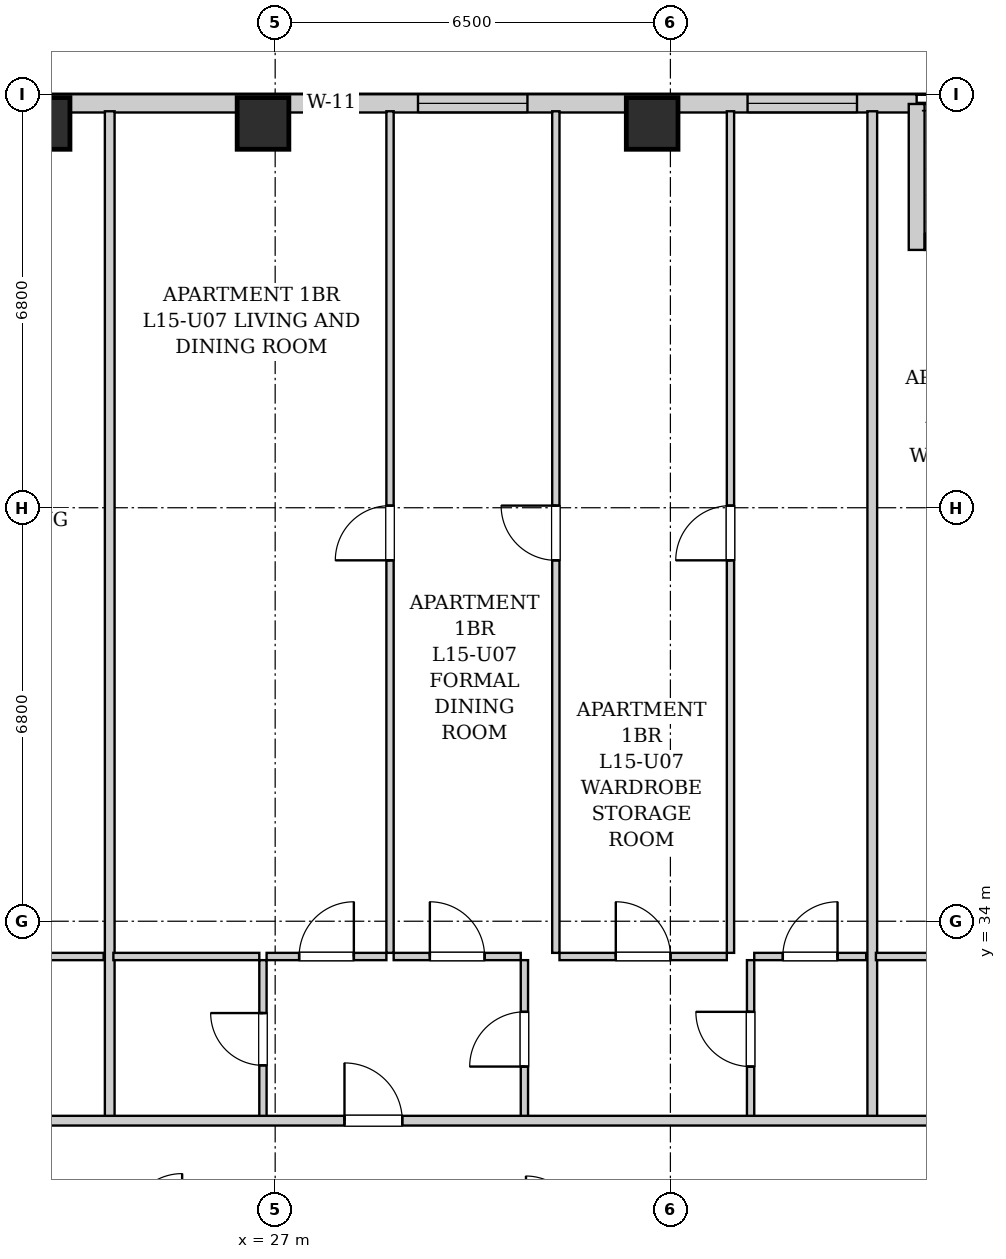
"""IFC4 building model, lengths in metres.
Left out: names, types, materials, properties, quantities, classifications, styles, units other than length and angle.
Written with IfcOpenShell. Run it as: python <this file> out.ifc"""

import sys

from ifc_helpers import new_model, si_unit, direction, frame, frame_2d, origin, origin_2d, place, context, subcontext, project, spatial, rectangle, extrude, element, fill, save


model = new_model("IFC4")
c1 = context("Model", 3, precision=1e-05, world=origin(), true_north=direction((0.0, 1.0)))
c2 = subcontext(c1, "Body", "Model", "MODEL_VIEW")
j1 = project(units=[si_unit("LENGTHUNIT", "METRE"), si_unit("PLANEANGLEUNIT", "RADIAN")], contexts=[c1])
p1 = place(None, origin())
s1 = spatial("IfcSite", under=j1, at=p1, CompositionType="ELEMENT")
p2 = place(p1, origin())
s2 = spatial("IfcBuilding", under=s1, at=p2, CompositionType="ELEMENT")
p3 = place(p2, frame((0.0, 0.0, 57.8)))
s3 = spatial("IfcBuildingStorey", under=s2, at=p3, CompositionType="ELEMENT", Elevation=57.8)
for number, where, z_axis, x_axis in (
    (1, (23.2, 47.12, 0.0), (0.0, 0.0, 1.0), (1.0, 0.0, 0.0)),
    (2, (26.8, 47.12, 0.0), (0.0, 0.0, 1.0), (1.0, 0.0, 0.0)),
    (3, (33.2, 47.12, 0.0), (0.0, 0.0, 1.0), (1.0, 0.0, 0.0)),
):
    element("IfcColumn", number, at=place(p3, frame(where, z_axis=z_axis, x_axis=x_axis)), inside=s3, PredefinedType="COLUMN", context=c2, shape_type="SweptSolid", body=[
        extrude(rectangle(XDim=0.85, YDim=0.85, at=origin_2d()), origin(), (0.0, 0.0, 1.0), 3.2),
    ])
p4 = place(p3, frame((10.0, 47.45, 0.0), z_axis=(0.0, 0.0, 1.0), x_axis=(1.0, 0.0, 0.0)))
e4 = element("IfcWall", 4, at=p4, inside=s3, PredefinedType="SOLIDWALL", context=c2, shape_type="SweptSolid", body=[
    extrude(rectangle(XDim=27.55, YDim=0.3, at=frame_2d((13.775, 0.0))), origin(), (0.0, 0.0, 1.0), 1.975),
])
p5 = place(p4, frame((1.735, 0.0, 0.55)))
e5 = element("IfcOpeningElement", 5, at=p5, cuts=e4, PredefinedType="OPENING", context=c2, shape_type="SweptSolid", body=[
    extrude(rectangle(XDim=1.8, YDim=1.2, at=frame_2d((0.9, 0.6))), frame((0.0, 0.16, 0.0), z_axis=(0.0, -1.0, 0.0), x_axis=(1.0, 0.0, 0.0)), (0.0, 0.0, 1.0), 0.32),
])
p6 = place(p4, frame((5.415, 0.0, 0.55)))
e6 = element("IfcOpeningElement", 6, at=p6, cuts=e4, PredefinedType="OPENING", context=c2, shape_type="SweptSolid", body=[
    extrude(rectangle(XDim=1.8, YDim=1.2, at=frame_2d((0.9, 0.6))), frame((0.0, 0.16, 0.0), z_axis=(0.0, -1.0, 0.0), x_axis=(1.0, 0.0, 0.0)), (0.0, 0.0, 1.0), 0.32),
])
p7 = place(p4, frame((10.617, 0.0, 0.55)))
e7 = element("IfcOpeningElement", 7, at=p7, cuts=e4, PredefinedType="OPENING", context=c2, shape_type="SweptSolid", body=[
    extrude(rectangle(XDim=1.8, YDim=1.2, at=frame_2d((0.9, 0.6))), frame((0.0, 0.16, 0.0), z_axis=(0.0, -1.0, 0.0), x_axis=(1.0, 0.0, 0.0)), (0.0, 0.0, 1.0), 0.32),
])
p8 = place(p4, frame((17.5, 0.0, 0.55)))
e8 = element("IfcOpeningElement", 8, at=p8, cuts=e4, PredefinedType="OPENING", context=c2, shape_type="SweptSolid", body=[
    extrude(rectangle(XDim=0.85, YDim=1.2, at=frame_2d((0.425, 0.6))), frame((0.0, 0.16, 0.0), z_axis=(0.0, -1.0, 0.0), x_axis=(1.0, 0.0, 0.0)), (0.0, 0.0, 1.0), 0.32),
])
p9 = place(p4, frame((19.349, 0.0, 0.55)))
e9 = element("IfcOpeningElement", 9, at=p9, cuts=e4, PredefinedType="OPENING", context=c2, shape_type="SweptSolid", body=[
    extrude(rectangle(XDim=1.8, YDim=1.2, at=frame_2d((0.9, 0.6))), frame((0.0, 0.16, 0.0), z_axis=(0.0, -1.0, 0.0), x_axis=(1.0, 0.0, 0.0)), (0.0, 0.0, 1.0), 0.32),
])
p10 = place(p4, frame((24.769, 0.0, 0.55)))
e10 = element("IfcOpeningElement", 10, at=p10, cuts=e4, PredefinedType="OPENING", context=c2, shape_type="SweptSolid", body=[
    extrude(rectangle(XDim=1.8, YDim=1.2, at=frame_2d((0.9, 0.6))), frame((0.0, 0.16, 0.0), z_axis=(0.0, -1.0, 0.0), x_axis=(1.0, 0.0, 0.0)), (0.0, 0.0, 1.0), 0.32),
])
p11 = place(p3, frame((37.55, 47.44, 0.0), z_axis=(0.0, 0.0, 1.0), x_axis=(0.0, -1.0, 0.0)))
e11 = element("IfcWall", 11, at=p11, inside=s3, PredefinedType="SOLIDWALL", context=c2, shape_type="SweptSolid", body=[
    extrude(rectangle(XDim=2.4, YDim=0.26, at=frame_2d((1.2, 0.0))), origin(), (0.0, 0.0, 1.0), 2.94),
])
p12 = place(p3, frame((37.684, 45.17, 0.0), z_axis=(0.0, 0.0, 1.0), x_axis=(1.0, 0.0, 0.0)))
e12 = element("IfcWall", 12, at=p12, inside=s3, PredefinedType="SOLIDWALL", context=c2, shape_type="SweptSolid", body=[
    extrude(rectangle(XDim=4.882, YDim=0.26, at=frame_2d((2.441, 0.0))), origin(), (0.0, 0.0, 1.0), 2.94),
])
p13 = place(p12, frame((2.496, 0.0, 0.0)))
e13 = element("IfcOpeningElement", 13, at=p13, cuts=e12, PredefinedType="OPENING", context=c2, shape_type="SweptSolid", body=[
    extrude(rectangle(XDim=1.1, YDim=2.0, at=frame_2d((0.55, 1.0))), frame((0.0, 0.14, 0.0), z_axis=(0.0, -1.0, 0.0), x_axis=(1.0, 0.0, 0.0)), (0.0, 0.0, 1.0), 0.28),
])
p14 = place(p12, frame((0.336, 0.0, 0.85)))
e14 = element("IfcOpeningElement", 14, at=p14, cuts=e12, PredefinedType="OPENING", context=c2, shape_type="SweptSolid", body=[
    extrude(rectangle(XDim=1.8, YDim=1.65, at=frame_2d((0.9, 0.825))), frame((0.0, 0.14, 0.0), z_axis=(0.0, -1.0, 0.0), x_axis=(1.0, 0.0, 0.0)), (0.0, 0.0, 1.0), 0.28),
])
p15 = place(p3, frame((20.826, 33.42, 0.0), z_axis=(0.0, 0.0, 1.0), x_axis=(1.0, 0.0, 0.0)))
e15 = element("IfcWall", 15, at=p15, inside=s3, PredefinedType="PARTITIONING", context=c2, shape_type="SweptSolid", body=[
    extrude(rectangle(XDim=3.353, YDim=0.12, at=frame_2d((1.677, 0.0))), origin(), (0.0, 0.0, 1.0), 2.94),
])
p16 = place(p15, frame((1.226, 0.0, 0.0)))
e16 = element("IfcOpeningElement", 16, at=p16, cuts=e15, PredefinedType="OPENING", context=c2, shape_type="SweptSolid", body=[
    extrude(rectangle(XDim=0.9, YDim=2.05, at=frame_2d((0.45, 1.025))), frame((0.0, 0.07, 0.0), z_axis=(0.0, -1.0, 0.0), x_axis=(1.0, 0.0, 0.0)), (0.0, 0.0, 1.0), 0.14),
])
p17 = place(p3, frame((24.279, 30.76, 0.0), z_axis=(0.0, 0.0, 1.0), x_axis=(0.0, 1.0, 0.0)))
e17 = element("IfcWall", 17, at=p17, inside=s3, PredefinedType="PARTITIONING", context=c2, shape_type="SweptSolid", body=[
    extrude(rectangle(XDim=16.56, YDim=0.16, at=frame_2d((8.28, 0.0))), origin(), (0.0, 0.0, 1.0), 2.94),
])
p18 = place(p3, frame((26.799, 30.76, 0.0), z_axis=(0.0, 0.0, 1.0), x_axis=(0.0, 1.0, 0.0)))
e18 = element("IfcWall", 18, at=p18, inside=s3, PredefinedType="PARTITIONING", context=c2, shape_type="SweptSolid", body=[
    extrude(rectangle(XDim=2.6, YDim=0.12, at=frame_2d((1.3, 0.0))), origin(), (0.0, 0.0, 1.0), 2.94),
])
p19 = place(p18, frame((0.87, 0.0, 0.0)))
e19 = element("IfcOpeningElement", 19, at=p19, cuts=e18, PredefinedType="OPENING", context=c2, shape_type="SweptSolid", body=[
    extrude(rectangle(XDim=0.86, YDim=2.05, at=frame_2d((0.43, 1.025))), frame((0.0, 0.07, 0.0), z_axis=(0.0, -1.0, 0.0), x_axis=(1.0, 0.0, 0.0)), (0.0, 0.0, 1.0), 0.14),
])
p20 = place(p3, frame((24.339, 33.42, 0.0), z_axis=(0.0, 0.0, 1.0), x_axis=(1.0, 0.0, 0.0)))
e20 = element("IfcWall", 20, at=p20, inside=s3, PredefinedType="PARTITIONING", context=c2, shape_type="SweptSolid", body=[
    extrude(rectangle(XDim=2.4, YDim=0.12, at=frame_2d((1.2, 0.0))), origin(), (0.0, 0.0, 1.0), 2.94),
])
p21 = place(p3, frame((31.099, 30.76, 0.0), z_axis=(0.0, 0.0, 1.0), x_axis=(0.0, 1.0, 0.0)))
e21 = element("IfcWall", 21, at=p21, inside=s3, PredefinedType="PARTITIONING", context=c2, shape_type="SweptSolid", body=[
    extrude(rectangle(XDim=2.6, YDim=0.12, at=frame_2d((1.3, 0.0))), origin(), (0.0, 0.0, 1.0), 2.94),
])
p22 = place(p21, frame((0.85, 0.0, 0.0)))
e22 = element("IfcOpeningElement", 22, at=p22, cuts=e21, PredefinedType="OPENING", context=c2, shape_type="SweptSolid", body=[
    extrude(rectangle(XDim=0.9, YDim=2.05, at=frame_2d((0.45, 1.025))), frame((0.0, 0.07, 0.0), z_axis=(0.0, -1.0, 0.0), x_axis=(1.0, 0.0, 0.0)), (0.0, 0.0, 1.0), 0.14),
])
p23 = place(p3, frame((26.859, 33.42, 0.0), z_axis=(0.0, 0.0, 1.0), x_axis=(1.0, 0.0, 0.0)))
e23 = element("IfcWall", 23, at=p23, inside=s3, PredefinedType="PARTITIONING", context=c2, shape_type="SweptSolid", body=[
    extrude(rectangle(XDim=1.97, YDim=0.12, at=frame_2d((0.985, 0.0))), origin(), (0.0, 0.0, 1.0), 2.94),
])
p24 = place(p23, frame((0.535, 0.0, 0.0)))
e24 = element("IfcOpeningElement", 24, at=p24, cuts=e23, PredefinedType="OPENING", context=c2, shape_type="SweptSolid", body=[
    extrude(rectangle(XDim=0.9, YDim=2.05, at=frame_2d((0.45, 1.025))), frame((0.0, 0.07, 0.0), z_axis=(0.0, -1.0, 0.0), x_axis=(1.0, 0.0, 0.0)), (0.0, 0.0, 1.0), 0.14),
])
p25 = place(p3, frame((28.949, 33.42, 0.0), z_axis=(0.0, 0.0, 1.0), x_axis=(1.0, 0.0, 0.0)))
e25 = element("IfcWall", 25, at=p25, inside=s3, PredefinedType="PARTITIONING", context=c2, shape_type="SweptSolid", body=[
    extrude(rectangle(XDim=2.09, YDim=0.12, at=frame_2d((1.045, 0.0))), origin(), (0.0, 0.0, 1.0), 2.94),
])
p26 = place(p25, frame((0.595, 0.0, 0.0)))
e26 = element("IfcOpeningElement", 26, at=p26, cuts=e25, PredefinedType="OPENING", context=c2, shape_type="SweptSolid", body=[
    extrude(rectangle(XDim=0.9, YDim=2.05, at=frame_2d((0.45, 1.025))), frame((0.0, 0.07, 0.0), z_axis=(0.0, -1.0, 0.0), x_axis=(1.0, 0.0, 0.0)), (0.0, 0.0, 1.0), 0.14),
])
p27 = place(p3, frame((34.819, 30.76, 0.0), z_axis=(0.0, 0.0, 1.0), x_axis=(0.0, 1.0, 0.0)))
e27 = element("IfcWall", 27, at=p27, inside=s3, PredefinedType="PARTITIONING", context=c2, shape_type="SweptSolid", body=[
    extrude(rectangle(XDim=2.6, YDim=0.12, at=frame_2d((1.3, 0.0))), origin(), (0.0, 0.0, 1.0), 2.94),
])
p28 = place(p27, frame((0.85, 0.0, 0.0)))
e28 = element("IfcOpeningElement", 28, at=p28, cuts=e27, PredefinedType="OPENING", context=c2, shape_type="SweptSolid", body=[
    extrude(rectangle(XDim=0.9, YDim=2.05, at=frame_2d((0.45, 1.025))), frame((0.0, 0.07, 0.0), z_axis=(0.0, -1.0, 0.0), x_axis=(1.0, 0.0, 0.0)), (0.0, 0.0, 1.0), 0.14),
])
p29 = place(p3, frame((31.676, 33.42, 0.0), z_axis=(0.0, 0.0, 1.0), x_axis=(1.0, 0.0, 0.0)))
e29 = element("IfcWall", 29, at=p29, inside=s3, PredefinedType="PARTITIONING", context=c2, shape_type="SweptSolid", body=[
    extrude(rectangle(XDim=2.752, YDim=0.12, at=frame_2d((1.376, 0.0))), origin(), (0.0, 0.0, 1.0), 2.94),
])
p30 = place(p29, frame((0.926, 0.0, 0.0)))
e30 = element("IfcOpeningElement", 30, at=p30, cuts=e29, PredefinedType="OPENING", context=c2, shape_type="SweptSolid", body=[
    extrude(rectangle(XDim=0.9, YDim=2.05, at=frame_2d((0.45, 1.025))), frame((0.0, 0.07, 0.0), z_axis=(0.0, -1.0, 0.0), x_axis=(1.0, 0.0, 0.0)), (0.0, 0.0, 1.0), 0.14),
])
p31 = place(p3, frame((34.879, 33.42, 0.0), z_axis=(0.0, 0.0, 1.0), x_axis=(1.0, 0.0, 0.0)))
e31 = element("IfcWall", 31, at=p31, inside=s3, PredefinedType="PARTITIONING", context=c2, shape_type="SweptSolid", body=[
    extrude(rectangle(XDim=1.841, YDim=0.12, at=frame_2d((0.92, 0.0))), origin(), (0.0, 0.0, 1.0), 2.94),
])
p32 = place(p31, frame((0.47, 0.0, 0.0)))
e32 = element("IfcOpeningElement", 32, at=p32, cuts=e31, PredefinedType="OPENING", context=c2, shape_type="SweptSolid", body=[
    extrude(rectangle(XDim=0.9, YDim=2.05, at=frame_2d((0.45, 1.025))), frame((0.0, 0.07, 0.0), z_axis=(0.0, -1.0, 0.0), x_axis=(1.0, 0.0, 0.0)), (0.0, 0.0, 1.0), 0.14),
])
p33 = place(p3, frame((28.889, 33.48, 0.0), z_axis=(0.0, 0.0, 1.0), x_axis=(0.0, 1.0, 0.0)))
e33 = element("IfcWall", 33, at=p33, inside=s3, PredefinedType="PARTITIONING", context=c2, shape_type="SweptSolid", body=[
    extrude(rectangle(XDim=13.84, YDim=0.12, at=frame_2d((6.92, 0.0))), origin(), (0.0, 0.0, 1.0), 2.94),
])
p34 = place(p33, frame((6.455, 0.0, 0.0)))
e34 = element("IfcOpeningElement", 34, at=p34, cuts=e33, PredefinedType="OPENING", context=c2, shape_type="SweptSolid", body=[
    extrude(rectangle(XDim=0.9, YDim=2.05, at=frame_2d((0.45, 1.025))), frame((0.0, 0.07, 0.0), z_axis=(0.0, -1.0, 0.0), x_axis=(1.0, 0.0, 0.0)), (0.0, 0.0, 1.0), 0.14),
])
p35 = place(p3, frame((31.616, 33.48, 0.0), z_axis=(0.0, 0.0, 1.0), x_axis=(0.0, 1.0, 0.0)))
e35 = element("IfcWall", 35, at=p35, inside=s3, PredefinedType="PARTITIONING", context=c2, shape_type="SweptSolid", body=[
    extrude(rectangle(XDim=13.84, YDim=0.12, at=frame_2d((6.92, 0.0))), origin(), (0.0, 0.0, 1.0), 2.94),
])
p36 = place(p35, frame((6.455, 0.0, 0.0)))
e36 = element("IfcOpeningElement", 36, at=p36, cuts=e35, PredefinedType="OPENING", context=c2, shape_type="SweptSolid", body=[
    extrude(rectangle(XDim=0.9, YDim=2.05, at=frame_2d((0.45, 1.025))), frame((0.0, 0.07, 0.0), z_axis=(0.0, -1.0, 0.0), x_axis=(1.0, 0.0, 0.0)), (0.0, 0.0, 1.0), 0.14),
])
p37 = place(p3, frame((34.488, 33.48, 0.0), z_axis=(0.0, 0.0, 1.0), x_axis=(0.0, 1.0, 0.0)))
e37 = element("IfcWall", 37, at=p37, inside=s3, PredefinedType="PARTITIONING", context=c2, shape_type="SweptSolid", body=[
    extrude(rectangle(XDim=13.84, YDim=0.12, at=frame_2d((6.92, 0.0))), origin(), (0.0, 0.0, 1.0), 2.94),
])
p38 = place(p37, frame((6.455, 0.0, 0.0)))
e38 = element("IfcOpeningElement", 38, at=p38, cuts=e37, PredefinedType="OPENING", context=c2, shape_type="SweptSolid", body=[
    extrude(rectangle(XDim=0.9, YDim=2.05, at=frame_2d((0.45, 1.025))), frame((0.0, 0.07, 0.0), z_axis=(0.0, -1.0, 0.0), x_axis=(1.0, 0.0, 0.0)), (0.0, 0.0, 1.0), 0.14),
])
p39 = place(p3, frame((36.82, 30.76, 0.0), z_axis=(0.0, 0.0, 1.0), x_axis=(0.0, 1.0, 0.0)))
e39 = element("IfcWall", 39, at=p39, inside=s3, PredefinedType="PARTITIONING", context=c2, shape_type="SweptSolid", body=[
    extrude(rectangle(XDim=16.56, YDim=0.16, at=frame_2d((8.28, 0.0))), origin(), (0.0, 0.0, 1.0), 2.94),
])
p40 = place(p3, frame((36.88, 33.42, 0.0), z_axis=(0.0, 0.0, 1.0), x_axis=(1.0, 0.0, 0.0)))
e40 = element("IfcWall", 40, at=p40, inside=s3, PredefinedType="PARTITIONING", context=c2, shape_type="SweptSolid", body=[
    extrude(rectangle(XDim=2.112, YDim=0.12, at=frame_2d((1.056, 0.0))), origin(), (0.0, 0.0, 1.0), 2.94),
])
p41 = place(p3, frame((10.05, 30.72, 0.0), z_axis=(0.0, 0.0, 1.0), x_axis=(1.0, 0.0, 0.0)))
e41 = element("IfcWall", 41, at=p41, inside=s3, PredefinedType="PARTITIONING", context=c2, shape_type="SweptSolid", body=[
    extrude(rectangle(XDim=33.9, YDim=0.16, at=frame_2d((16.95, 0.0))), origin(), (0.0, 0.0, 1.0), 2.94),
])
p42 = place(p41, frame((3.8, 0.0, 0.0)))
e42 = element("IfcOpeningElement", 42, at=p42, cuts=e41, PredefinedType="OPENING", context=c2, shape_type="SweptSolid", body=[
    extrude(rectangle(XDim=0.95, YDim=2.1, at=frame_2d((0.475, 1.05))), frame((0.0, 0.09, 0.0), z_axis=(0.0, -1.0, 0.0), x_axis=(1.0, 0.0, 0.0)), (0.0, 0.0, 1.0), 0.18),
])
p43 = place(p41, frame((11.977, 0.0, 0.0)))
e43 = element("IfcOpeningElement", 43, at=p43, cuts=e41, PredefinedType="OPENING", context=c2, shape_type="SweptSolid", body=[
    extrude(rectangle(XDim=0.95, YDim=2.1, at=frame_2d((0.475, 1.05))), frame((0.0, 0.09, 0.0), z_axis=(0.0, -1.0, 0.0), x_axis=(1.0, 0.0, 0.0)), (0.0, 0.0, 1.0), 0.18),
])
p44 = place(p41, frame((18.09, 0.0, 0.0)))
e44 = element("IfcOpeningElement", 44, at=p44, cuts=e41, PredefinedType="OPENING", context=c2, shape_type="SweptSolid", body=[
    extrude(rectangle(XDim=0.95, YDim=2.1, at=frame_2d((0.475, 1.05))), frame((0.0, 0.09, 0.0), z_axis=(0.0, -1.0, 0.0), x_axis=(1.0, 0.0, 0.0)), (0.0, 0.0, 1.0), 0.18),
])
p45 = place(p41, frame((30.956, 0.0, 0.0)))
e45 = element("IfcOpeningElement", 45, at=p45, cuts=e41, PredefinedType="OPENING", context=c2, shape_type="SweptSolid", body=[
    extrude(rectangle(XDim=0.95, YDim=2.1, at=frame_2d((0.475, 1.05))), frame((0.0, 0.09, 0.0), z_axis=(0.0, -1.0, 0.0), x_axis=(1.0, 0.0, 0.0)), (0.0, 0.0, 1.0), 0.18),
])
p46 = place(p19, origin())
e46 = element("IfcDoor", 46, at=p46, inside=s3, OperationType="SINGLE_SWING_RIGHT", PredefinedType="DOOR", context=c2, shape_type="SweptSolid", body=[
    extrude(rectangle(XDim=0.86, YDim=2.05, at=frame_2d((0.43, 1.025))), frame((0.0, 0.025, 0.0), z_axis=(0.0, -1.0, 0.0), x_axis=(1.0, 0.0, 0.0)), (0.0, 0.0, 1.0), 0.05),
])
fill(e19, e46)
p47 = place(p22, origin())
e47 = element("IfcDoor", 47, at=p47, inside=s3, OperationType="SINGLE_SWING_LEFT", PredefinedType="DOOR", context=c2, shape_type="SweptSolid", body=[
    extrude(rectangle(XDim=0.9, YDim=2.05, at=frame_2d((0.45, 1.025))), frame((0.0, 0.025, 0.0), z_axis=(0.0, -1.0, 0.0), x_axis=(1.0, 0.0, 0.0)), (0.0, 0.0, 1.0), 0.05),
])
fill(e22, e47)
p48 = place(p24, origin())
e48 = element("IfcDoor", 48, at=p48, inside=s3, OperationType="SINGLE_SWING_RIGHT", PredefinedType="DOOR", context=c2, shape_type="SweptSolid", body=[
    extrude(rectangle(XDim=0.9, YDim=2.05, at=frame_2d((0.45, 1.025))), frame((0.0, 0.025, 0.0), z_axis=(0.0, -1.0, 0.0), x_axis=(1.0, 0.0, 0.0)), (0.0, 0.0, 1.0), 0.05),
])
fill(e24, e48)
p49 = place(p26, origin())
e49 = element("IfcDoor", 49, at=p49, inside=s3, OperationType="SINGLE_SWING_LEFT", PredefinedType="DOOR", context=c2, shape_type="SweptSolid", body=[
    extrude(rectangle(XDim=0.9, YDim=2.05, at=frame_2d((0.45, 1.025))), frame((0.0, 0.025, 0.0), z_axis=(0.0, -1.0, 0.0), x_axis=(1.0, 0.0, 0.0)), (0.0, 0.0, 1.0), 0.05),
])
fill(e26, e49)
p50 = place(p28, origin())
e50 = element("IfcDoor", 50, at=p50, inside=s3, OperationType="SINGLE_SWING_RIGHT", PredefinedType="DOOR", context=c2, shape_type="SweptSolid", body=[
    extrude(rectangle(XDim=0.9, YDim=2.05, at=frame_2d((0.45, 1.025))), frame((0.0, 0.025, 0.0), z_axis=(0.0, -1.0, 0.0), x_axis=(1.0, 0.0, 0.0)), (0.0, 0.0, 1.0), 0.05),
])
fill(e28, e50)
p51 = place(p30, origin())
e51 = element("IfcDoor", 51, at=p51, inside=s3, OperationType="SINGLE_SWING_LEFT", PredefinedType="DOOR", context=c2, shape_type="SweptSolid", body=[
    extrude(rectangle(XDim=0.9, YDim=2.05, at=frame_2d((0.45, 1.025))), frame((0.0, 0.025, 0.0), z_axis=(0.0, -1.0, 0.0), x_axis=(1.0, 0.0, 0.0)), (0.0, 0.0, 1.0), 0.05),
])
fill(e30, e51)
p52 = place(p32, origin())
e52 = element("IfcDoor", 52, at=p52, inside=s3, OperationType="SINGLE_SWING_RIGHT", PredefinedType="DOOR", context=c2, shape_type="SweptSolid", body=[
    extrude(rectangle(XDim=0.9, YDim=2.05, at=frame_2d((0.45, 1.025))), frame((0.0, 0.025, 0.0), z_axis=(0.0, -1.0, 0.0), x_axis=(1.0, 0.0, 0.0)), (0.0, 0.0, 1.0), 0.05),
])
fill(e32, e52)
p53 = place(p34, origin())
e53 = element("IfcDoor", 53, at=p53, inside=s3, OperationType="SINGLE_SWING_LEFT", PredefinedType="DOOR", context=c2, shape_type="SweptSolid", body=[
    extrude(rectangle(XDim=0.9, YDim=2.05, at=frame_2d((0.45, 1.025))), frame((0.0, 0.025, 0.0), z_axis=(0.0, -1.0, 0.0), x_axis=(1.0, 0.0, 0.0)), (0.0, 0.0, 1.0), 0.05),
])
fill(e34, e53)
p54 = place(p36, origin())
e54 = element("IfcDoor", 54, at=p54, inside=s3, OperationType="SINGLE_SWING_RIGHT", PredefinedType="DOOR", context=c2, shape_type="SweptSolid", body=[
    extrude(rectangle(XDim=0.9, YDim=2.05, at=frame_2d((0.45, 1.025))), frame((0.0, 0.025, 0.0), z_axis=(0.0, -1.0, 0.0), x_axis=(1.0, 0.0, 0.0)), (0.0, 0.0, 1.0), 0.05),
])
fill(e36, e54)
p55 = place(p38, origin())
e55 = element("IfcDoor", 55, at=p55, inside=s3, OperationType="SINGLE_SWING_LEFT", PredefinedType="DOOR", context=c2, shape_type="SweptSolid", body=[
    extrude(rectangle(XDim=0.9, YDim=2.05, at=frame_2d((0.45, 1.025))), frame((0.0, 0.025, 0.0), z_axis=(0.0, -1.0, 0.0), x_axis=(1.0, 0.0, 0.0)), (0.0, 0.0, 1.0), 0.05),
])
fill(e38, e55)
p56 = place(p44, origin())
e56 = element("IfcDoor", 56, at=p56, inside=s3, OperationType="SINGLE_SWING_LEFT", PredefinedType="DOOR", context=c2, shape_type="SweptSolid", body=[
    extrude(rectangle(XDim=0.95, YDim=2.1, at=frame_2d((0.475, 1.05))), frame((0.0, 0.025, 0.0), z_axis=(0.0, -1.0, 0.0), x_axis=(1.0, 0.0, 0.0)), (0.0, 0.0, 1.0), 0.05),
])
fill(e44, e56)
p57 = place(p8, origin())
e57 = element("IfcWindow", 57, at=p57, inside=s3, PartitioningType="SINGLE_PANEL", PredefinedType="WINDOW", context=c2, shape_type="SweptSolid", body=[
    extrude(rectangle(XDim=0.85, YDim=1.2, at=frame_2d((0.425, 0.6))), frame((0.0, 0.03, 0.0), z_axis=(0.0, -1.0, 0.0), x_axis=(1.0, 0.0, 0.0)), (0.0, 0.0, 1.0), 0.06),
])
fill(e8, e57)
p58 = place(p9, origin())
e58 = element("IfcWindow", 58, at=p58, inside=s3, PartitioningType="DOUBLE_PANEL_VERTICAL", PredefinedType="WINDOW", context=c2, shape_type="SweptSolid", body=[
    extrude(rectangle(XDim=1.8, YDim=1.2, at=frame_2d((0.9, 0.6))), frame((0.0, 0.03, 0.0), z_axis=(0.0, -1.0, 0.0), x_axis=(1.0, 0.0, 0.0)), (0.0, 0.0, 1.0), 0.06),
])
fill(e9, e58)
p59 = place(p10, origin())
e59 = element("IfcWindow", 59, at=p59, inside=s3, PartitioningType="DOUBLE_PANEL_VERTICAL", PredefinedType="WINDOW", context=c2, shape_type="SweptSolid", body=[
    extrude(rectangle(XDim=1.8, YDim=1.2, at=frame_2d((0.9, 0.6))), frame((0.0, 0.03, 0.0), z_axis=(0.0, -1.0, 0.0), x_axis=(1.0, 0.0, 0.0)), (0.0, 0.0, 1.0), 0.06),
])
fill(e10, e59)
save(model, sys.argv[1])
